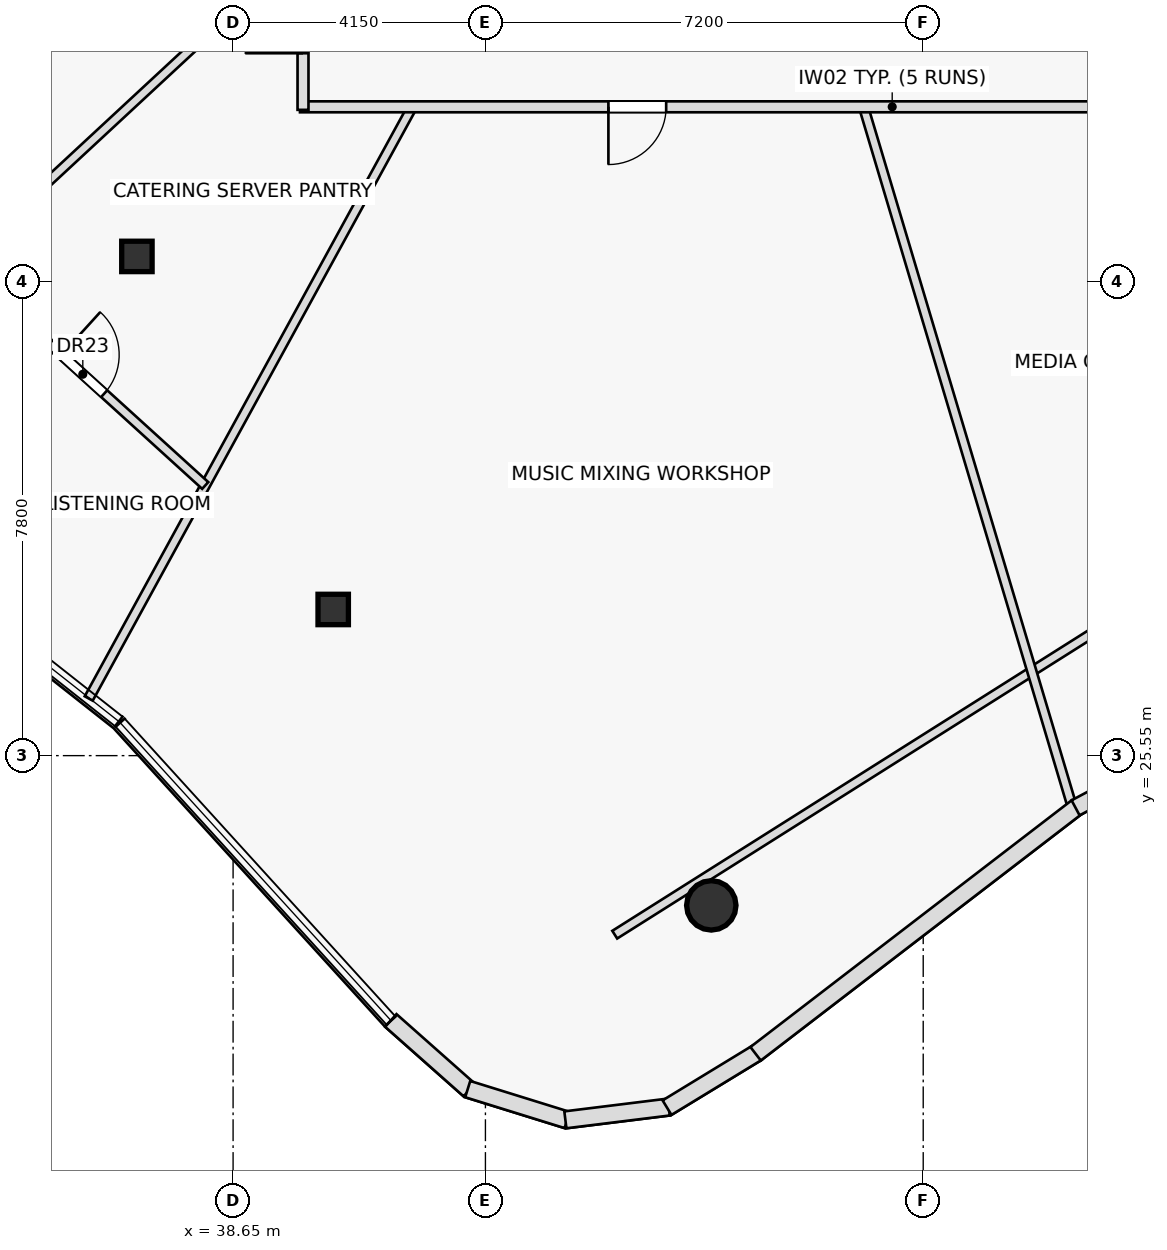
"""IFC4 building model, lengths in metres.
Left out: names, types, materials, properties, quantities, classifications, styles, units other than length and angle.
Written with IfcOpenShell. Run it as: python <this file> out.ifc"""

import sys

from ifc_helpers import new_model, si_unit, direction, frame, frame_2d, origin, origin_2d, place, context, subcontext, project, spatial, rectangle, hollow_rectangle, hollow_circle, extrude, element, fill, save


model = new_model("IFC4")
c1 = context("Model", 3, precision=1e-05, world=origin(), true_north=direction((0.0, 1.0)))
c2 = subcontext(c1, "Body", "Model", "MODEL_VIEW")
j1 = project(units=[si_unit("LENGTHUNIT", "METRE"), si_unit("PLANEANGLEUNIT", "RADIAN")], contexts=[c1])
p1 = place(None, origin())
s1 = spatial("IfcSite", under=j1, at=p1, CompositionType="ELEMENT")
p2 = place(p1, origin())
s2 = spatial("IfcBuilding", under=s1, at=p2, CompositionType="ELEMENT")
p3 = place(p2, frame((0.0, 0.0, 273.5)))
s3 = spatial("IfcBuildingStorey", under=s2, at=p3, CompositionType="ELEMENT", Elevation=273.5)
for number, where, z_axis, x_axis in (
    (1, (37.068, 33.76, 0.0), (0.0, 0.0, 1.0), (1.0, 0.0, 0.0)),
    (2, (40.296, 27.954, 0.0), (0.0, 0.0, 1.0), (1.0, 0.0, 0.0)),
):
    element("IfcColumn", number, at=place(p3, frame(where, z_axis=z_axis, x_axis=x_axis)), inside=s3, PredefinedType="COLUMN", context=c2, shape_type="SweptSolid", body=[
        extrude(hollow_rectangle(XDim=0.5, YDim=0.5, WallThickness=0.03, at=origin_2d()), origin(), (0.0, 0.0, 1.0), 3.7),
    ])
p4 = place(p3, frame((46.515, 23.087, 0.0), z_axis=(0.0, 0.0, 1.0), x_axis=(1.0, 0.0, 0.0)))
e3 = element("IfcColumn", 3, at=p4, inside=s3, PredefinedType="COLUMN", context=c2, shape_type="SweptSolid", body=[
    extrude(hollow_circle(Radius=0.406, WallThickness=0.036, at=origin_2d()), origin(), (0.0, 0.0, 1.0), 3.7),
])
p5 = place(p3, frame((44.927, 22.605, 0.0), z_axis=(0.0, 0.0, 1.0), x_axis=(0.845624548895, 0.533778158326, 0.0)))
e4 = element("IfcWall", 4, at=p5, inside=s3, PredefinedType="PARTITIONING", context=c2, shape_type="SweptSolid", body=[
    extrude(rectangle(XDim=10.861, YDim=0.15, at=frame_2d((5.431, 0.0))), origin(), (0.0, 0.0, 1.0), 3.175),
])
p6 = place(p3, frame((39.8, 38.878, 0.0), z_axis=(0.0, 0.0, 1.0), x_axis=(-0.733167714009, -0.680047868267, 0.0)))
e5 = element("IfcWall", 5, at=p6, inside=s3, PredefinedType="PARTITIONING", context=c2, shape_type="SweptSolid", body=[
    extrude(rectangle(XDim=12.01, YDim=0.15, at=frame_2d((6.005, 0.0))), origin(), (0.0, 0.0, 1.0), 3.235),
])
p7 = place(p3, frame((41.598, 36.22, 0.0), z_axis=(0.0, 0.0, 1.0), x_axis=(-0.47986053117, -0.877344784349, 0.0)))
e6 = element("IfcWall", 6, at=p7, inside=s3, PredefinedType="PARTITIONING", context=c2, shape_type="SweptSolid", body=[
    extrude(rectangle(XDim=11.09, YDim=0.15, at=frame_2d((5.545, 0.0))), origin(), (0.0, 0.0, 1.0), 3.235),
])
p8 = place(p3, frame((49.018, 36.22, 0.0), z_axis=(0.0, 0.0, 1.0), x_axis=(0.285746818713, -0.958305147432, 0.0)))
e7 = element("IfcWall", 7, at=p8, inside=s3, PredefinedType="PARTITIONING", context=c2, shape_type="SweptSolid", body=[
    extrude(rectangle(XDim=12.076, YDim=0.15, at=frame_2d((6.038, 0.0))), origin(), (0.0, 0.0, 1.0), 3.235),
])
p9 = place(p3, frame((34.165, 33.652, 0.0), z_axis=(0.0, 0.0, 1.0), x_axis=(0.740108571655, -0.67248739926, 0.0)))
e8 = element("IfcWall", 8, at=p9, inside=s3, PredefinedType="PARTITIONING", context=c2, shape_type="SweptSolid", body=[
    extrude(rectangle(XDim=5.441, YDim=0.15, at=frame_2d((2.72, 0.0))), origin(), (0.0, 0.0, 1.0), 3.7),
])
p10 = place(p9, frame((2.245, 0.0, 0.0)))
e9 = element("IfcOpeningElement", 9, at=p10, cuts=e8, PredefinedType="OPENING", context=c2, shape_type="SweptSolid", body=[
    extrude(rectangle(XDim=0.95, YDim=2.05, at=frame_2d((0.475, 1.025))), frame((0.0, 0.085, 0.0), z_axis=(0.0, -1.0, 0.0), x_axis=(1.0, 0.0, 0.0)), (0.0, 0.0, 1.0), 0.17),
])
p11 = place(p3, frame((59.23, 36.22, 0.0), z_axis=(0.0, 0.0, 1.0), x_axis=(-1.0, 0.0, 0.0)))
e10 = element("IfcWall", 10, at=p11, inside=s3, PredefinedType="PARTITIONING", context=c2, shape_type="SweptSolid", body=[
    extrude(rectangle(XDim=19.48, YDim=0.18, at=frame_2d((9.74, 0.0))), origin(), (0.0, 0.0, 1.0), 3.175),
])
p12 = place(p11, frame((4.731, 0.0, 0.0)))
e11 = element("IfcOpeningElement", 11, at=p12, cuts=e10, PredefinedType="OPENING", context=c2, shape_type="SweptSolid", body=[
    extrude(rectangle(XDim=0.95, YDim=2.05, at=frame_2d((0.475, 1.025))), frame((0.0, 0.1, 0.0), z_axis=(0.0, -1.0, 0.0), x_axis=(1.0, 0.0, 0.0)), (0.0, 0.0, 1.0), 0.2),
])
p13 = place(p11, frame((13.458, 0.0, 0.0)))
e12 = element("IfcOpeningElement", 12, at=p13, cuts=e10, PredefinedType="OPENING", context=c2, shape_type="SweptSolid", body=[
    extrude(rectangle(XDim=0.95, YDim=2.05, at=frame_2d((0.475, 1.025))), frame((0.0, 0.1, 0.0), z_axis=(0.0, -1.0, 0.0), x_axis=(1.0, 0.0, 0.0)), (0.0, 0.0, 1.0), 0.2),
])
p14 = place(p3, frame((39.8, 36.17, 0.0), z_axis=(0.0, 0.0, 1.0), x_axis=(0.0, 1.0, 0.0)))
e13 = element("IfcWall", 13, at=p14, inside=s3, PredefinedType="PARTITIONING", context=c2, shape_type="SweptSolid", body=[
    extrude(rectangle(XDim=4.08, YDim=0.18, at=frame_2d((2.04, 0.0))), origin(), (0.0, 0.0, 1.0), 3.7),
])
p15 = place(p14, frame((0.931, 0.0, 0.0)))
e14 = element("IfcOpeningElement", 14, at=p15, cuts=e13, PredefinedType="OPENING", context=c2, shape_type="SweptSolid", body=[
    extrude(rectangle(XDim=0.95, YDim=2.05, at=frame_2d((0.475, 1.025))), frame((0.0, 0.1, 0.0), z_axis=(0.0, -1.0, 0.0), x_axis=(1.0, 0.0, 0.0)), (0.0, 0.0, 1.0), 0.2),
])
p16 = place(p3, frame((41.244, 21.195, 0.0), z_axis=(0.0, 0.0, 1.0), x_axis=(0.74838528564, -0.663264249177, 0.0)))
e15 = element("IfcWall", 15, at=p16, inside=s3, PredefinedType="STANDARD", context=c2, shape_type="SweptSolid", body=[
    extrude(rectangle(XDim=1.724, YDim=0.28, at=frame_2d((0.862, 0.0))), origin(), (0.0, 0.0, 1.0), 3.7),
])
for number, where, z_axis, x_axis in (
    (16, (42.509, 20.066, 0.0), (0.0, 0.0, 1.0), (0.955, -0.297, 0.0)),
    (17, (44.115, 19.561, 0.0), (0.0, 0.0, 1.0), (0.992, 0.123, 0.0)),
):
    element("IfcWall", number, at=place(p3, frame(where, z_axis=z_axis, x_axis=x_axis)), inside=s3, PredefinedType="STANDARD", context=c2, shape_type="SweptSolid", body=[
        extrude(rectangle(XDim=1.712, YDim=0.28, at=frame_2d((0.856, 0.0))), origin(), (0.0, 0.0, 1.0), 3.7),
    ])
p17 = place(p3, frame((45.787, 19.761, 0.0), z_axis=(0.0, 0.0, 1.0), x_axis=(0.853983788168, 0.520299615171, 0.0)))
e18 = element("IfcWall", 18, at=p17, inside=s3, PredefinedType="STANDARD", context=c2, shape_type="SweptSolid", body=[
    extrude(rectangle(XDim=1.735, YDim=0.28, at=frame_2d((0.867, 0.0))), origin(), (0.0, 0.0, 1.0), 3.7),
])
p18 = place(p3, frame((47.243, 20.647, 0.0), z_axis=(0.0, 0.0, 1.0), x_axis=(0.793119256527, 0.609066371528, 0.0)))
e19 = element("IfcWall", 19, at=p18, inside=s3, PredefinedType="STANDARD", context=c2, shape_type="SweptSolid", body=[
    extrude(rectangle(XDim=6.667, YDim=0.28, at=frame_2d((3.333, 0.0))), origin(), (0.0, 0.0, 1.0), 3.7),
])
p19 = place(p3, frame((52.506, 24.691, 0.0), z_axis=(0.0, 0.0, 1.0), x_axis=(0.882414857541, 0.470472123713, 0.0)))
e20 = element("IfcWall", 20, at=p19, inside=s3, PredefinedType="STANDARD", context=c2, shape_type="SweptSolid", body=[
    extrude(rectangle(XDim=7.312, YDim=0.28, at=frame_2d((3.656, 0.0))), origin(), (0.0, 0.0, 1.0), 3.7),
])
p20 = place(p10, origin())
e21 = element("IfcDoor", 21, at=p20, inside=s3, OperationType="SINGLE_SWING_LEFT", PredefinedType="DOOR", context=c2, shape_type="SweptSolid", body=[
    extrude(rectangle(XDim=0.95, YDim=2.05, at=frame_2d((0.475, 1.025))), frame((0.0, 0.025, 0.0), z_axis=(0.0, -1.0, 0.0), x_axis=(1.0, 0.0, 0.0)), (0.0, 0.0, 1.0), 0.05),
])
fill(e9, e21)
p21 = place(p13, origin())
e22 = element("IfcDoor", 22, at=p21, inside=s3, OperationType="SINGLE_SWING_RIGHT", PredefinedType="DOOR", context=c2, shape_type="SweptSolid", body=[
    extrude(rectangle(XDim=0.95, YDim=2.05, at=frame_2d((0.475, 1.025))), frame((0.0, 0.025, 0.0), z_axis=(0.0, -1.0, 0.0), x_axis=(1.0, 0.0, 0.0)), (0.0, 0.0, 1.0), 0.05),
])
fill(e12, e22)
p22 = place(p15, origin())
e23 = element("IfcDoor", 23, at=p22, inside=s3, OperationType="SINGLE_SWING_LEFT", PredefinedType="DOOR", context=c2, shape_type="SweptSolid", body=[
    extrude(rectangle(XDim=0.95, YDim=2.05, at=frame_2d((0.475, 1.025))), frame((0.0, 0.025, 0.0), z_axis=(0.0, -1.0, 0.0), x_axis=(1.0, 0.0, 0.0)), (0.0, 0.0, 1.0), 0.05),
])
fill(e14, e23)
save(model, sys.argv[1])
